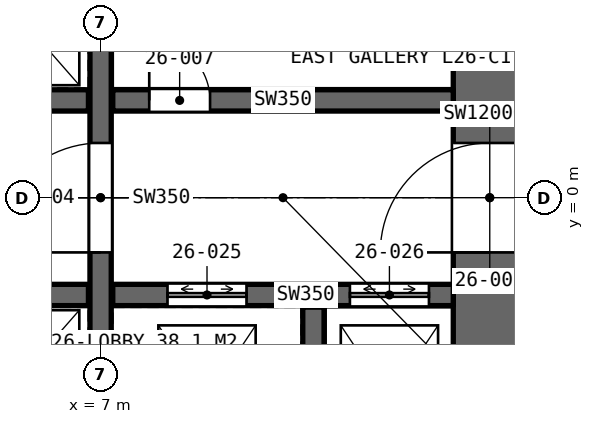
"""IFC4 building model, lengths in metres.
Left out: names, types, materials, properties, quantities, classifications, styles, units other than length and angle.
Written with IfcOpenShell. Run it as: python <this file> out.ifc"""

import sys

from ifc_helpers import new_model, si_unit, direction, frame, frame_2d, origin, place, context, subcontext, project, spatial, rectangle, extrude, element, fill, save


model = new_model("IFC4")
c1 = context("Model", 3, precision=1e-05, world=origin(), true_north=direction((0.0, 1.0)))
c2 = subcontext(c1, "Body", "Model", "MODEL_VIEW")
j1 = project(units=[si_unit("LENGTHUNIT", "METRE"), si_unit("PLANEANGLEUNIT", "RADIAN")], contexts=[c1])
p1 = place(None, origin())
s1 = spatial("IfcSite", under=j1, at=p1, CompositionType="ELEMENT")
p2 = place(p1, origin())
s2 = spatial("IfcBuilding", under=s1, at=p2, CompositionType="ELEMENT")
p3 = place(p2, frame((0.0, 0.0, 126.0)))
s3 = spatial("IfcBuildingStorey", under=s2, at=p3, CompositionType="ELEMENT", Elevation=126.0)
p4 = place(p3, frame((13.4, -8.8, 0.0), z_axis=(0.0, 0.0, 1.0), x_axis=(0.0, 1.0, 0.0)))
e1 = element("IfcWall", 1, at=p4, inside=s3, PredefinedType="SHEAR", context=c2, shape_type="SweptSolid", body=[
    extrude(rectangle(XDim=17.6, YDim=1.2, at=frame_2d((8.8, 0.0))), origin(), (0.0, 0.0, 1.0), 4.2),
])
p5 = place(p4, frame((7.9, 0.0, 0.0)))
e2 = element("IfcOpeningElement", 2, at=p5, cuts=e1, PredefinedType="OPENING", context=c2, shape_type="SweptSolid", body=[
    extrude(rectangle(XDim=1.8, YDim=2.4, at=frame_2d((0.9, 1.2))), frame((0.0, 0.61, 0.0), z_axis=(0.0, -1.0, 0.0), x_axis=(1.0, 0.0, 0.0)), (0.0, 0.0, 1.0), 1.22),
])
p6 = place(p3, frame((7.0, -8.8, 0.0), z_axis=(0.0, 0.0, 1.0), x_axis=(0.0, 1.0, 0.0)))
e3 = element("IfcWall", 3, at=p6, inside=s3, PredefinedType="SHEAR", context=c2, shape_type="SweptSolid", body=[
    extrude(rectangle(XDim=17.6, YDim=0.35, at=frame_2d((8.8, 0.0))), origin(), (0.0, 0.0, 1.0), 4.2),
])
p7 = place(p6, frame((7.9, 0.0, 0.0)))
e4 = element("IfcOpeningElement", 4, at=p7, cuts=e3, PredefinedType="OPENING", context=c2, shape_type="SweptSolid", body=[
    extrude(rectangle(XDim=1.8, YDim=2.4, at=frame_2d((0.9, 1.2))), frame((0.0, 0.185, 0.0), z_axis=(0.0, -1.0, 0.0), x_axis=(1.0, 0.0, 0.0)), (0.0, 0.0, 1.0), 0.37),
])
p8 = place(p3, frame((-6.8, 1.6, 0.0), z_axis=(0.0, 0.0, 1.0), x_axis=(1.0, 0.0, 0.0)))
e5 = element("IfcWall", 5, at=p8, inside=s3, PredefinedType="SHEAR", context=c2, shape_type="SweptSolid", body=[
    extrude(rectangle(XDim=13.6, YDim=0.35, at=frame_2d((6.8, 0.0))), origin(), (0.0, 0.0, 1.0), 4.2),
])
p9 = place(p8, frame((1.265, 0.0, 0.0)))
e6 = element("IfcOpeningElement", 6, at=p9, cuts=e5, PredefinedType="OPENING", context=c2, shape_type="SweptSolid", body=[
    extrude(rectangle(XDim=1.0, YDim=2.4, at=frame_2d((0.5, 1.2))), frame((0.0, 0.185, 0.0), z_axis=(0.0, -1.0, 0.0), x_axis=(1.0, 0.0, 0.0)), (0.0, 0.0, 1.0), 0.37),
])
p10 = place(p8, frame((4.0, 0.0, 0.0)))
e7 = element("IfcOpeningElement", 7, at=p10, cuts=e5, PredefinedType="OPENING", context=c2, shape_type="SweptSolid", body=[
    extrude(rectangle(XDim=1.0, YDim=2.4, at=frame_2d((0.5, 1.2))), frame((0.0, 0.185, 0.0), z_axis=(0.0, -1.0, 0.0), x_axis=(1.0, 0.0, 0.0)), (0.0, 0.0, 1.0), 0.37),
])
p11 = place(p8, frame((7.635, 0.0, 0.0)))
e8 = element("IfcOpeningElement", 8, at=p11, cuts=e5, PredefinedType="OPENING", context=c2, shape_type="SweptSolid", body=[
    extrude(rectangle(XDim=1.0, YDim=2.4, at=frame_2d((0.5, 1.2))), frame((0.0, 0.185, 0.0), z_axis=(0.0, -1.0, 0.0), x_axis=(1.0, 0.0, 0.0)), (0.0, 0.0, 1.0), 0.37),
])
p12 = place(p3, frame((-6.8, -1.6, 0.0), z_axis=(0.0, 0.0, 1.0), x_axis=(1.0, 0.0, 0.0)))
e9 = element("IfcWall", 9, at=p12, inside=s3, PredefinedType="SHEAR", context=c2, shape_type="SweptSolid", body=[
    extrude(rectangle(XDim=13.6, YDim=0.35, at=frame_2d((6.8, 0.0))), origin(), (0.0, 0.0, 1.0), 4.2),
])
p13 = place(p12, frame((0.7, 0.0, 0.0)))
e10 = element("IfcOpeningElement", 10, at=p13, cuts=e9, PredefinedType="OPENING", context=c2, shape_type="SweptSolid", body=[
    extrude(rectangle(XDim=1.1, YDim=2.4, at=frame_2d((0.55, 1.2))), frame((0.0, 0.185, 0.0), z_axis=(0.0, -1.0, 0.0), x_axis=(1.0, 0.0, 0.0)), (0.0, 0.0, 1.0), 0.37),
])
p14 = place(p12, frame((3.5, 0.0, 0.0)))
e11 = element("IfcOpeningElement", 11, at=p14, cuts=e9, PredefinedType="OPENING", context=c2, shape_type="SweptSolid", body=[
    extrude(rectangle(XDim=1.1, YDim=2.4, at=frame_2d((0.55, 1.2))), frame((0.0, 0.185, 0.0), z_axis=(0.0, -1.0, 0.0), x_axis=(1.0, 0.0, 0.0)), (0.0, 0.0, 1.0), 0.37),
])
p15 = place(p12, frame((6.3, 0.0, 0.0)))
e12 = element("IfcOpeningElement", 12, at=p15, cuts=e9, PredefinedType="OPENING", context=c2, shape_type="SweptSolid", body=[
    extrude(rectangle(XDim=1.1, YDim=2.4, at=frame_2d((0.55, 1.2))), frame((0.0, 0.185, 0.0), z_axis=(0.0, -1.0, 0.0), x_axis=(1.0, 0.0, 0.0)), (0.0, 0.0, 1.0), 0.37),
])
p16 = place(p12, frame((9.1, 0.0, 0.0)))
e13 = element("IfcOpeningElement", 13, at=p16, cuts=e9, PredefinedType="OPENING", context=c2, shape_type="SweptSolid", body=[
    extrude(rectangle(XDim=1.1, YDim=2.4, at=frame_2d((0.55, 1.2))), frame((0.0, 0.185, 0.0), z_axis=(0.0, -1.0, 0.0), x_axis=(1.0, 0.0, 0.0)), (0.0, 0.0, 1.0), 0.37),
])
p17 = place(p3, frame((7.2, 1.6, 0.0), z_axis=(0.0, 0.0, 1.0), x_axis=(1.0, 0.0, 0.0)))
e14 = element("IfcWall", 14, at=p17, inside=s3, PredefinedType="SHEAR", context=c2, shape_type="SweptSolid", body=[
    extrude(rectangle(XDim=5.6, YDim=0.35, at=frame_2d((2.8, 0.0))), origin(), (0.0, 0.0, 1.0), 4.2),
])
p18 = place(p17, frame((0.6, 0.0, 0.0)))
e15 = element("IfcOpeningElement", 15, at=p18, cuts=e14, PredefinedType="OPENING", context=c2, shape_type="SweptSolid", body=[
    extrude(rectangle(XDim=1.0, YDim=2.4, at=frame_2d((0.5, 1.2))), frame((0.0, 0.185, 0.0), z_axis=(0.0, -1.0, 0.0), x_axis=(1.0, 0.0, 0.0)), (0.0, 0.0, 1.0), 0.37),
])
p19 = place(p3, frame((7.2, -1.6, 0.0), z_axis=(0.0, 0.0, 1.0), x_axis=(1.0, 0.0, 0.0)))
e16 = element("IfcWall", 16, at=p19, inside=s3, PredefinedType="SHEAR", context=c2, shape_type="SweptSolid", body=[
    extrude(rectangle(XDim=5.6, YDim=0.35, at=frame_2d((2.8, 0.0))), origin(), (0.0, 0.0, 1.0), 4.2),
])
p20 = place(p19, frame((0.9, 0.0, 0.0)))
e17 = element("IfcOpeningElement", 17, at=p20, cuts=e16, PredefinedType="OPENING", context=c2, shape_type="SweptSolid", body=[
    extrude(rectangle(XDim=1.3, YDim=2.4, at=frame_2d((0.65, 1.2))), frame((0.0, 0.185, 0.0), z_axis=(0.0, -1.0, 0.0), x_axis=(1.0, 0.0, 0.0)), (0.0, 0.0, 1.0), 0.37),
])
p21 = place(p19, frame((3.9, 0.0, 0.0)))
e18 = element("IfcOpeningElement", 18, at=p21, cuts=e16, PredefinedType="OPENING", context=c2, shape_type="SweptSolid", body=[
    extrude(rectangle(XDim=1.3, YDim=2.4, at=frame_2d((0.65, 1.2))), frame((0.0, 0.185, 0.0), z_axis=(0.0, -1.0, 0.0), x_axis=(1.0, 0.0, 0.0)), (0.0, 0.0, 1.0), 0.37),
])
p22 = place(p3, frame((10.5, -4.8, 0.0), z_axis=(0.0, 0.0, 1.0), x_axis=(0.0, 1.0, 0.0)))
e19 = element("IfcWall", 19, at=p22, inside=s3, PredefinedType="SHEAR", context=c2, shape_type="SweptSolid", body=[
    extrude(rectangle(XDim=3.0, YDim=0.35, at=frame_2d((1.5, 0.0))), origin(), (0.0, 0.0, 1.0), 4.2),
])
p23 = place(p5, origin())
e20 = element("IfcDoor", 20, at=p23, inside=s3, OperationType="DOUBLE_DOOR_SINGLE_SWING", PredefinedType="DOOR", context=c2, shape_type="SweptSolid", body=[
    extrude(rectangle(XDim=1.8, YDim=2.4, at=frame_2d((0.9, 1.2))), frame((0.0, 0.025, 0.0), z_axis=(0.0, -1.0, 0.0), x_axis=(1.0, 0.0, 0.0)), (0.0, 0.0, 1.0), 0.05),
])
fill(e2, e20)
p24 = place(p7, origin())
e21 = element("IfcDoor", 21, at=p24, inside=s3, OperationType="DOUBLE_DOOR_SINGLE_SWING", PredefinedType="DOOR", context=c2, shape_type="SweptSolid", body=[
    extrude(rectangle(XDim=1.8, YDim=2.4, at=frame_2d((0.9, 1.2))), frame((0.0, 0.025, 0.0), z_axis=(0.0, -1.0, 0.0), x_axis=(1.0, 0.0, 0.0)), (0.0, 0.0, 1.0), 0.05),
])
fill(e4, e21)
p25 = place(p18, origin())
e22 = element("IfcDoor", 22, at=p25, inside=s3, OperationType="SINGLE_SWING_LEFT", PredefinedType="DOOR", context=c2, shape_type="SweptSolid", body=[
    extrude(rectangle(XDim=1.0, YDim=2.4, at=frame_2d((0.5, 1.2))), frame((0.0, 0.025, 0.0), z_axis=(0.0, -1.0, 0.0), x_axis=(1.0, 0.0, 0.0)), (0.0, 0.0, 1.0), 0.05),
])
fill(e15, e22)
p26 = place(p20, origin())
e23 = element("IfcDoor", 23, at=p26, inside=s3, OperationType="DOUBLE_DOOR_SLIDING", PredefinedType="DOOR", context=c2, shape_type="SweptSolid", body=[
    extrude(rectangle(XDim=1.3, YDim=2.4, at=frame_2d((0.65, 1.2))), frame((0.0, 0.025, 0.0), z_axis=(0.0, -1.0, 0.0), x_axis=(1.0, 0.0, 0.0)), (0.0, 0.0, 1.0), 0.05),
])
fill(e17, e23)
p27 = place(p21, origin())
e24 = element("IfcDoor", 24, at=p27, inside=s3, OperationType="DOUBLE_DOOR_SLIDING", PredefinedType="DOOR", context=c2, shape_type="SweptSolid", body=[
    extrude(rectangle(XDim=1.3, YDim=2.4, at=frame_2d((0.65, 1.2))), frame((0.0, 0.025, 0.0), z_axis=(0.0, -1.0, 0.0), x_axis=(1.0, 0.0, 0.0)), (0.0, 0.0, 1.0), 0.05),
])
fill(e18, e24)
save(model, sys.argv[1])
